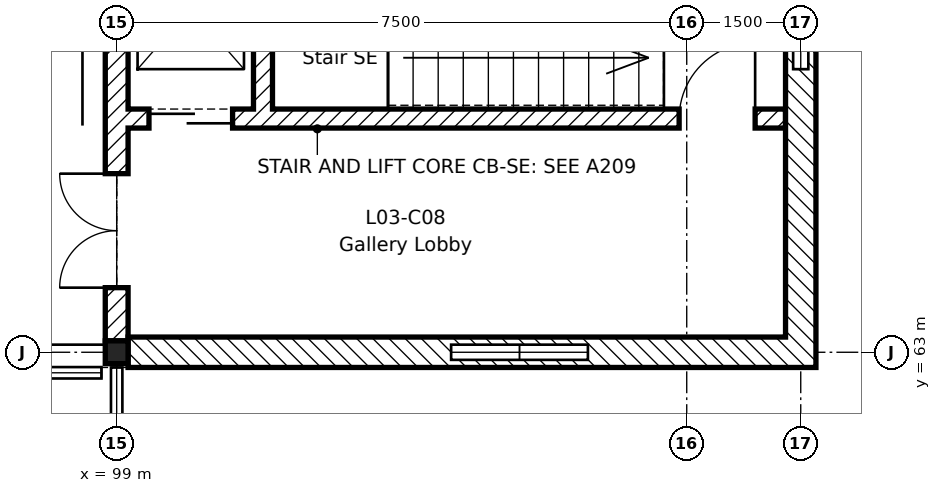
"""IFC4 building model, lengths in metres.
Left out: names, types, materials, properties, quantities, classifications, styles, units other than length and angle.
Written with IfcOpenShell. Run it as: python <this file> out.ifc"""

import sys

from ifc_helpers import new_model, si_unit, direction, frame, frame_2d, origin, origin_2d, place, context, subcontext, project, spatial, rectangle, hollow_rectangle, extrude, element, fill, save


model = new_model("IFC4")
c1 = context("Model", 3, precision=1e-05, world=origin(), true_north=direction((0.0, 1.0)))
c2 = subcontext(c1, "Body", "Model", "MODEL_VIEW")
j1 = project(units=[si_unit("LENGTHUNIT", "METRE"), si_unit("PLANEANGLEUNIT", "RADIAN")], contexts=[c1])
p1 = place(None, origin())
s1 = spatial("IfcSite", under=j1, at=p1, CompositionType="ELEMENT")
p2 = place(p1, origin())
s2 = spatial("IfcBuilding", under=s1, at=p2, CompositionType="ELEMENT")
p3 = place(p2, frame((0.0, 0.0, 14.4)))
s3 = spatial("IfcBuildingStorey", under=s2, at=p3, CompositionType="ELEMENT", Elevation=14.4)
p4 = place(p3, frame((99.0, 63.0, -0.25), z_axis=(0.0, 0.0, 1.0), x_axis=(1.0, 0.0, 0.0)))
e1 = element("IfcColumn", 1, at=p4, inside=s3, PredefinedType="COLUMN", context=c2, shape_type="SweptSolid", body=[
    extrude(hollow_rectangle(XDim=0.3, YDim=0.3, WallThickness=0.016, at=origin_2d()), origin(), (0.0, 0.0, 1.0), 4.2),
])
p5 = place(p3, frame((99.0, 63.15, 0.0), z_axis=(0.0, 0.0, 1.0), x_axis=(0.0, 1.0, 0.0)))
e2 = element("IfcWall", 2, at=p5, inside=s3, PredefinedType="SHEAR", context=c2, shape_type="SweptSolid", body=[
    extrude(rectangle(XDim=9.0, YDim=0.3, at=frame_2d((4.5, 0.0))), origin(), (0.0, 0.0, 1.0), 4.0),
])
p6 = place(p5, frame((0.7, 0.0, 0.0)))
e3 = element("IfcOpeningElement", 3, at=p6, cuts=e2, PredefinedType="OPENING", context=c2, shape_type="SweptSolid", body=[
    extrude(rectangle(XDim=1.5, YDim=2.4, at=frame_2d((0.75, 1.2))), frame((0.0, 0.16, 0.0), z_axis=(0.0, -1.0, 0.0), x_axis=(1.0, 0.0, 0.0)), (0.0, 0.0, 1.0), 0.32),
])
p7 = place(p3, frame((107.8, 66.075, 0.0), z_axis=(0.0, 0.0, 1.0), x_axis=(-1.0, 0.0, 0.0)))
e4 = element("IfcWall", 4, at=p7, inside=s3, PredefinedType="SHEAR", context=c2, shape_type="SweptSolid", body=[
    extrude(rectangle(XDim=8.65, YDim=0.25, at=frame_2d((4.325, 0.0))), origin(), (0.0, 0.0, 1.0), 4.0),
])
p8 = place(p7, frame((0.4, 0.0, 0.0)))
e5 = element("IfcOpeningElement", 5, at=p8, cuts=e4, PredefinedType="OPENING", context=c2, shape_type="SweptSolid", body=[
    extrude(rectangle(XDim=1.0, YDim=2.1, at=frame_2d((0.5, 1.05))), frame((0.0, 0.135, 0.0), z_axis=(0.0, -1.0, 0.0), x_axis=(1.0, 0.0, 0.0)), (0.0, 0.0, 1.0), 0.27),
])
p9 = place(p7, frame((7.275, 0.0, 0.0)))
e6 = element("IfcOpeningElement", 6, at=p9, cuts=e4, PredefinedType="OPENING", context=c2, shape_type="SweptSolid", body=[
    extrude(rectangle(XDim=1.1, YDim=2.1, at=frame_2d((0.55, 1.05))), frame((0.0, 0.135, 0.0), z_axis=(0.0, -1.0, 0.0), x_axis=(1.0, 0.0, 0.0)), (0.0, 0.0, 1.0), 0.27),
])
p10 = place(p3, frame((100.925, 66.2, 0.0), z_axis=(0.0, 0.0, 1.0), x_axis=(0.0, 1.0, 0.0)))
e7 = element("IfcWall", 7, at=p10, inside=s3, PredefinedType="SHEAR", context=c2, shape_type="SweptSolid", body=[
    extrude(rectangle(XDim=2.85, YDim=0.25, at=frame_2d((1.425, 0.0))), origin(), (0.0, 0.0, 1.0), 4.0),
])
p11 = place(p3, frame((99.15, 63.0, 0.0), z_axis=(0.0, 0.0, 1.0), x_axis=(1.0, 0.0, 0.0)))
e8 = element("IfcWall", 8, at=p11, inside=s3, PredefinedType="STANDARD", context=c2, shape_type="SweptSolid", body=[
    extrude(rectangle(XDim=4.25, YDim=0.4, at=frame_2d((2.125, 0.0))), origin(), (0.0, 0.0, 1.0), 4.0),
])
p12 = place(p3, frame((105.2, 63.0, 0.0), z_axis=(0.0, 0.0, 1.0), x_axis=(1.0, 0.0, 0.0)))
e9 = element("IfcWall", 9, at=p12, inside=s3, PredefinedType="STANDARD", context=c2, shape_type="SweptSolid", body=[
    extrude(rectangle(XDim=3.0, YDim=0.4, at=frame_2d((1.5, 0.0))), origin(), (0.0, 0.0, 1.0), 4.0),
])
p13 = place(p3, frame((103.4, 63.0, 0.0), z_axis=(0.0, 0.0, 1.0), x_axis=(1.0, 0.0, 0.0)))
e10 = element("IfcWall", 10, at=p13, inside=s3, PredefinedType="STANDARD", context=c2, shape_type="SweptSolid", body=[
    extrude(rectangle(XDim=1.8, YDim=0.4, at=frame_2d((0.9, 0.0))), origin(), (0.0, 0.0, 1.0), 0.9),
])
p14 = place(p3, frame((108.0, 63.2, 0.0), z_axis=(0.0, 0.0, 1.0), x_axis=(0.0, 1.0, 0.0)))
e11 = element("IfcWall", 11, at=p14, inside=s3, PredefinedType="STANDARD", context=c2, shape_type="SweptSolid", body=[
    extrude(rectangle(XDim=3.525, YDim=0.4, at=frame_2d((1.763, 0.0))), origin(), (0.0, 0.0, 1.0), 4.0),
])
p15 = place(p3, frame((108.0, 66.725, 0.0), z_axis=(0.0, 0.0, 1.0), x_axis=(0.0, 1.0, 0.0)))
e12 = element("IfcWall", 12, at=p15, inside=s3, PredefinedType="STANDARD", context=c2, shape_type="SweptSolid", body=[
    extrude(rectangle(XDim=1.8, YDim=0.4, at=frame_2d((0.9, 0.0))), origin(), (0.0, 0.0, 1.0), 0.9),
])
p16 = place(p8, frame((1.0, 0.0, 0.0), z_axis=(0.0, 0.0, 1.0), x_axis=(-1.0, 0.0, 0.0)))
e13 = element("IfcDoor", 13, at=p16, inside=s3, OperationType="SINGLE_SWING_RIGHT", PredefinedType="DOOR", context=c2, shape_type="SweptSolid", body=[
    extrude(rectangle(XDim=1.0, YDim=2.1, at=frame_2d((0.5, 1.05))), frame((0.0, 0.025, 0.0), z_axis=(0.0, -1.0, 0.0), x_axis=(1.0, 0.0, 0.0)), (0.0, 0.0, 1.0), 0.05),
])
fill(e5, e13)
p17 = place(p6, origin())
e14 = element("IfcDoor", 14, at=p17, inside=s3, OperationType="DOUBLE_DOOR_SINGLE_SWING", PredefinedType="DOOR", context=c2, shape_type="SweptSolid", body=[
    extrude(rectangle(XDim=1.5, YDim=2.4, at=frame_2d((0.75, 1.2))), frame((0.0, 0.025, 0.0), z_axis=(0.0, -1.0, 0.0), x_axis=(1.0, 0.0, 0.0)), (0.0, 0.0, 1.0), 0.05),
])
fill(e3, e14)
p18 = place(p9, origin())
e15 = element("IfcDoor", 15, at=p18, inside=s3, OperationType="SLIDING_TO_LEFT", PredefinedType="DOOR", context=c2, shape_type="SweptSolid", body=[
    extrude(rectangle(XDim=1.1, YDim=2.1, at=frame_2d((0.55, 1.05))), frame((0.0, 0.025, 0.0), z_axis=(0.0, -1.0, 0.0), x_axis=(1.0, 0.0, 0.0)), (0.0, 0.0, 1.0), 0.05),
])
fill(e6, e15)
save(model, sys.argv[1])
